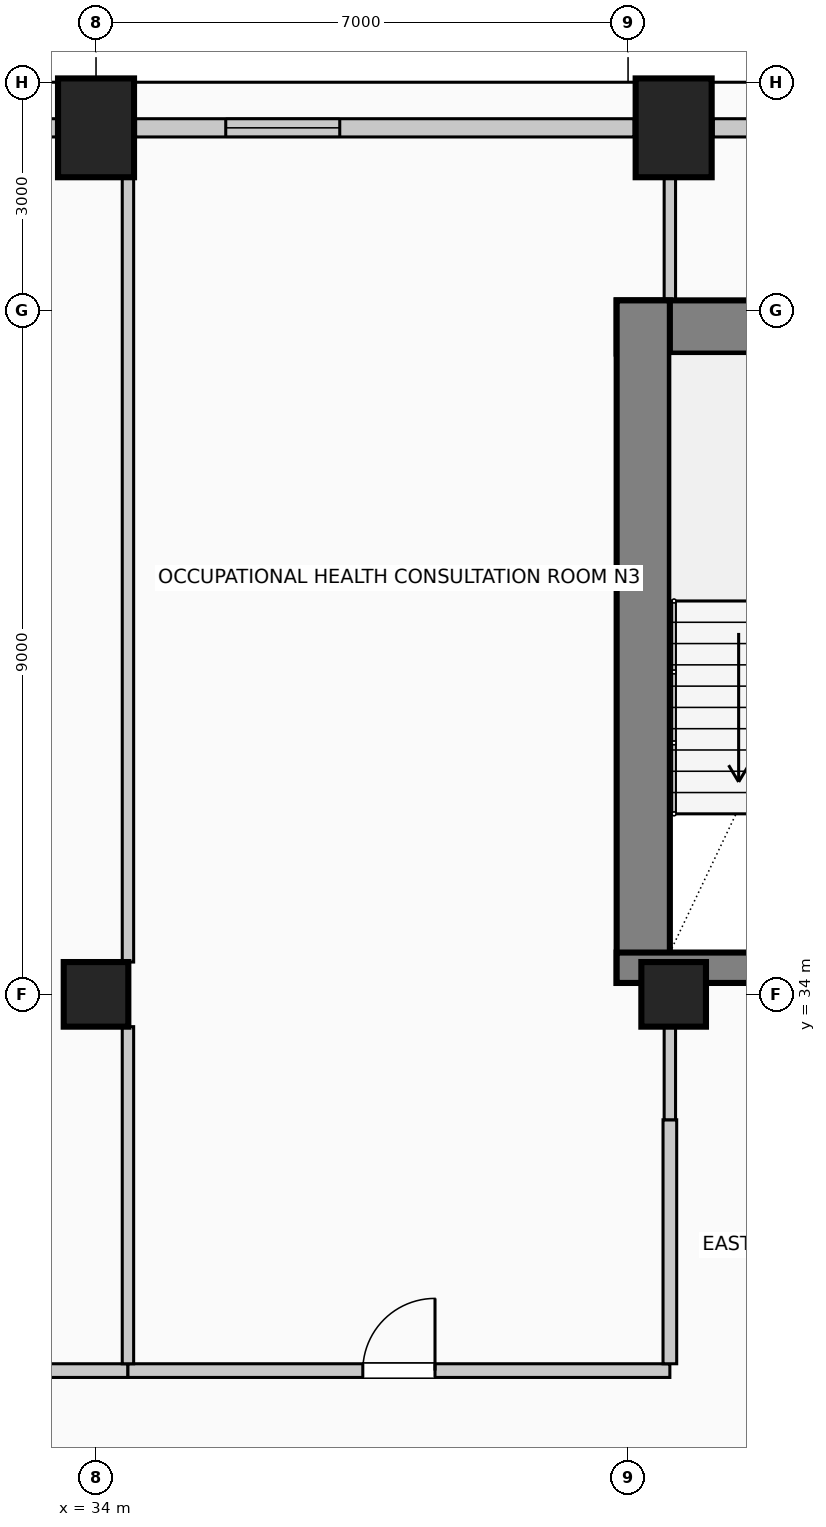
"""IFC4 building model, lengths in metres.
Left out: names, types, materials, properties, quantities, classifications, styles, units other than length and angle.
Written with IfcOpenShell. Run it as: python <this file> out.ifc"""

import sys

from ifc_helpers import new_model, si_unit, direction, frame, frame_2d, origin, origin_2d, place, context, subcontext, project, spatial, rectangle, circle, extrude, element, fill, save


model = new_model("IFC4")
c1 = context("Model", 3, precision=1e-05, world=origin(), true_north=direction((0.0, 1.0)))
c2 = subcontext(c1, "Body", "Model", "MODEL_VIEW")
j1 = project(units=[si_unit("LENGTHUNIT", "METRE"), si_unit("PLANEANGLEUNIT", "RADIAN")], contexts=[c1])
p1 = place(None, origin())
s1 = spatial("IfcSite", under=j1, at=p1, CompositionType="ELEMENT")
p2 = place(p1, origin())
s2 = spatial("IfcBuilding", under=s1, at=p2, CompositionType="ELEMENT")
p3 = place(p2, frame((0.0, 0.0, 268.6)))
s3 = spatial("IfcBuildingStorey", under=s2, at=p3, CompositionType="ELEMENT", Elevation=268.6)
p4 = place(p3, frame((40.85, 42.78, 0.0), z_axis=(0.0, 0.0, 1.0), x_axis=(1.0, 0.0, 0.0)))
e1 = element("IfcWall", 1, at=p4, inside=s3, PredefinedType="SHEAR", context=c2, shape_type="SweptSolid", body=[
    extrude(rectangle(XDim=14.3, YDim=0.7, at=frame_2d((7.15, 0.0))), origin(), (0.0, 0.0, 1.0), 4.0),
])
p5 = place(p3, frame((41.2, 34.15, 0.0), z_axis=(0.0, 0.0, 1.0), x_axis=(0.0, 1.0, 0.0)))
e2 = element("IfcWall", 2, at=p5, inside=s3, PredefinedType="SHEAR", context=c2, shape_type="SweptSolid", body=[
    extrude(rectangle(XDim=8.98, YDim=0.7, at=frame_2d((4.49, 0.0))), origin(), (0.0, 0.0, 1.0), 4.0),
])
p6 = place(p3, frame((40.85, 34.35, 0.0), z_axis=(0.0, 0.0, 1.0), x_axis=(1.0, 0.0, 0.0)))
e3 = element("IfcWall", 3, at=p6, inside=s3, PredefinedType="SHEAR", context=c2, shape_type="SweptSolid", body=[
    extrude(rectangle(XDim=4.86, YDim=0.4, at=frame_2d((2.43, 0.0))), origin(), (0.0, 0.0, 1.0), 4.0),
])
p7 = place(p6, frame((2.4, 0.0, 0.0)))
e4 = element("IfcOpeningElement", 4, at=p7, cuts=e3, PredefinedType="OPENING", context=c2, shape_type="SweptSolid", body=[
    extrude(rectangle(XDim=1.15, YDim=2.2, at=frame_2d((0.575, 1.1))), frame((0.0, 0.21, 0.0), z_axis=(0.0, -1.0, 0.0), x_axis=(1.0, 0.0, 0.0)), (0.0, 0.0, 1.0), 0.42),
])
for number, where, z_axis, x_axis in (
    (5, (34.0, 45.4, 0.0), (0.0, 0.0, 1.0), (1.0, 0.0, 0.0)),
    (6, (41.6, 45.4, 0.0), (0.0, 0.0, 1.0), (1.0, 0.0, 0.0)),
):
    element("IfcColumn", number, at=place(p3, frame(where, z_axis=z_axis, x_axis=x_axis)), inside=s3, PredefinedType="COLUMN", context=c2, shape_type="SweptSolid", body=[
        extrude(rectangle(XDim=1.0, YDim=1.3, at=origin_2d()), origin(), (0.0, 0.0, 1.0), 4.0),
    ])
for number, where, z_axis, x_axis in (
    (7, (41.6, 34.0, 0.0), (0.0, 0.0, 1.0), (1.0, 0.0, 0.0)),
    (8, (34.0, 34.0, 0.0), (0.0, 0.0, 1.0), (1.0, 0.0, 0.0)),
):
    element("IfcColumn", number, at=place(p3, frame(where, z_axis=z_axis, x_axis=x_axis)), inside=s3, PredefinedType="COLUMN", context=c2, shape_type="SweptSolid", body=[
        extrude(circle(Radius=0.425, at=origin_2d()), origin(), (0.0, 0.0, 1.0), 4.0),
    ])
p8 = place(p3, frame((29.395, 45.4, 0.0), z_axis=(0.0, 0.0, 1.0), x_axis=(1.0, 0.0, 0.0)))
e9 = element("IfcWall", 9, at=p8, inside=s3, PredefinedType="SOLIDWALL", context=c2, shape_type="SweptSolid", body=[
    extrude(rectangle(XDim=4.085, YDim=0.24, at=frame_2d((2.042, 0.0))), origin(), (0.0, 0.0, 1.0), 3.0),
])
p9 = place(p8, frame((1.292, 0.0, 0.42)))
e10 = element("IfcOpeningElement", 10, at=p9, cuts=e9, PredefinedType="OPENING", context=c2, shape_type="SweptSolid", body=[
    extrude(rectangle(XDim=1.5, YDim=2.2, at=frame_2d((0.75, 1.1))), frame((0.0, 0.13, 0.0), z_axis=(0.0, -1.0, 0.0), x_axis=(1.0, 0.0, 0.0)), (0.0, 0.0, 1.0), 0.26),
])
p10 = place(p3, frame((34.52, 45.4, 0.0), z_axis=(0.0, 0.0, 1.0), x_axis=(1.0, 0.0, 0.0)))
e11 = element("IfcWall", 11, at=p10, inside=s3, PredefinedType="SOLIDWALL", context=c2, shape_type="SweptSolid", body=[
    extrude(rectangle(XDim=6.56, YDim=0.24, at=frame_2d((3.28, 0.0))), origin(), (0.0, 0.0, 1.0), 3.0),
])
p11 = place(p10, frame((1.187, 0.0, 0.42)))
e12 = element("IfcOpeningElement", 12, at=p11, cuts=e11, PredefinedType="OPENING", context=c2, shape_type="SweptSolid", body=[
    extrude(rectangle(XDim=1.5, YDim=2.2, at=frame_2d((0.75, 1.1))), frame((0.0, 0.13, 0.0), z_axis=(0.0, -1.0, 0.0), x_axis=(1.0, 0.0, 0.0)), (0.0, 0.0, 1.0), 0.26),
])
p12 = place(p3, frame((42.12, 45.4, 0.0), z_axis=(0.0, 0.0, 1.0), x_axis=(1.0, 0.0, 0.0)))
e13 = element("IfcWall", 13, at=p12, inside=s3, PredefinedType="SOLIDWALL", context=c2, shape_type="SweptSolid", body=[
    extrude(rectangle(XDim=1.485, YDim=0.24, at=frame_2d((0.742, 0.0))), origin(), (0.0, 0.0, 1.0), 3.0),
])
p13 = place(p3, frame((30.23, 29.05, 0.0), z_axis=(0.0, 0.0, 1.0), x_axis=(1.0, 0.0, 0.0)))
e14 = element("IfcWall", 14, at=p13, inside=s3, PredefinedType="PARTITIONING", context=c2, shape_type="SweptSolid", body=[
    extrude(rectangle(XDim=4.19, YDim=0.18, at=frame_2d((2.095, 0.0))), origin(), (0.0, 0.0, 1.0), 3.75),
])
p14 = place(p13, frame((1.57, 0.0, 0.0)))
e15 = element("IfcOpeningElement", 15, at=p14, cuts=e14, PredefinedType="OPENING", context=c2, shape_type="SweptSolid", body=[
    extrude(rectangle(XDim=1.05, YDim=2.15, at=frame_2d((0.525, 1.075))), frame((0.0, 0.1, 0.0), z_axis=(0.0, -1.0, 0.0), x_axis=(1.0, 0.0, 0.0)), (0.0, 0.0, 1.0), 0.2),
])
p15 = place(p3, frame((34.42, 29.05, 0.0), z_axis=(0.0, 0.0, 1.0), x_axis=(1.0, 0.0, 0.0)))
e16 = element("IfcWall", 16, at=p15, inside=s3, PredefinedType="PARTITIONING", context=c2, shape_type="SweptSolid", body=[
    extrude(rectangle(XDim=7.13, YDim=0.18, at=frame_2d((3.565, 0.0))), origin(), (0.0, 0.0, 1.0), 3.75),
])
p16 = place(p15, frame((3.09, 0.0, 0.0)))
e17 = element("IfcOpeningElement", 17, at=p16, cuts=e16, PredefinedType="OPENING", context=c2, shape_type="SweptSolid", body=[
    extrude(rectangle(XDim=0.95, YDim=2.15, at=frame_2d((0.475, 1.075))), frame((0.0, 0.1, 0.0), z_axis=(0.0, -1.0, 0.0), x_axis=(1.0, 0.0, 0.0)), (0.0, 0.0, 1.0), 0.2),
])
p17 = place(p3, frame((34.42, 29.14, 0.0), z_axis=(0.0, 0.0, 1.0), x_axis=(0.0, 1.0, 0.0)))
e18 = element("IfcWall", 18, at=p17, inside=s3, PredefinedType="PARTITIONING", context=c2, shape_type="SweptSolid", body=[
    extrude(rectangle(XDim=4.435, YDim=0.15, at=frame_2d((2.218, 0.0))), origin(), (0.0, 0.0, 1.0), 3.75),
])
p18 = place(p3, frame((34.42, 34.425, 0.0), z_axis=(0.0, 0.0, 1.0), x_axis=(0.0, 1.0, 0.0)))
e19 = element("IfcWall", 19, at=p18, inside=s3, PredefinedType="PARTITIONING", context=c2, shape_type="SweptSolid", body=[
    extrude(rectangle(XDim=10.325, YDim=0.15, at=frame_2d((5.163, 0.0))), origin(), (0.0, 0.0, 1.0), 3.75),
])
p19 = place(p3, frame((41.55, 29.14, 0.0), z_axis=(0.0, 0.0, 1.0), x_axis=(0.0, 1.0, 0.0)))
e20 = element("IfcWall", 20, at=p19, inside=s3, PredefinedType="PARTITIONING", context=c2, shape_type="SweptSolid", body=[
    extrude(rectangle(XDim=3.21, YDim=0.18, at=frame_2d((1.605, 0.0))), origin(), (0.0, 0.0, 1.0), 3.195),
])
p20 = place(p3, frame((41.55, 32.35, 0.0), z_axis=(0.0, 0.0, 1.0), x_axis=(0.0, 1.0, 0.0)))
e21 = element("IfcWall", 21, at=p20, inside=s3, PredefinedType="PARTITIONING", context=c2, shape_type="SweptSolid", body=[
    extrude(rectangle(XDim=1.225, YDim=0.15, at=frame_2d((0.612, 0.0))), origin(), (0.0, 0.0, 1.0), 3.195),
])
p21 = place(p3, frame((41.55, 43.13, 0.0), z_axis=(0.0, 0.0, 1.0), x_axis=(0.0, 1.0, 0.0)))
e22 = element("IfcWall", 22, at=p21, inside=s3, PredefinedType="PARTITIONING", context=c2, shape_type="SweptSolid", body=[
    extrude(rectangle(XDim=1.62, YDim=0.15, at=frame_2d((0.81, 0.0))), origin(), (0.0, 0.0, 1.0), 3.75),
])
p22 = place(p11, origin())
e23 = element("IfcWindow", 23, at=p22, inside=s3, PartitioningType="SINGLE_PANEL", PredefinedType="WINDOW", context=c2, shape_type="SweptSolid", body=[
    extrude(rectangle(XDim=1.5, YDim=2.2, at=frame_2d((0.75, 1.1))), frame((0.0, 0.03, 0.0), z_axis=(0.0, -1.0, 0.0), x_axis=(1.0, 0.0, 0.0)), (0.0, 0.0, 1.0), 0.06),
])
fill(e12, e23)
p23 = place(p16, origin())
e24 = element("IfcDoor", 24, at=p23, inside=s3, OperationType="SINGLE_SWING_RIGHT", PredefinedType="DOOR", context=c2, shape_type="SweptSolid", body=[
    extrude(rectangle(XDim=0.95, YDim=2.15, at=frame_2d((0.475, 1.075))), frame((0.0, 0.025, 0.0), z_axis=(0.0, -1.0, 0.0), x_axis=(1.0, 0.0, 0.0)), (0.0, 0.0, 1.0), 0.05),
])
fill(e17, e24)
save(model, sys.argv[1])
